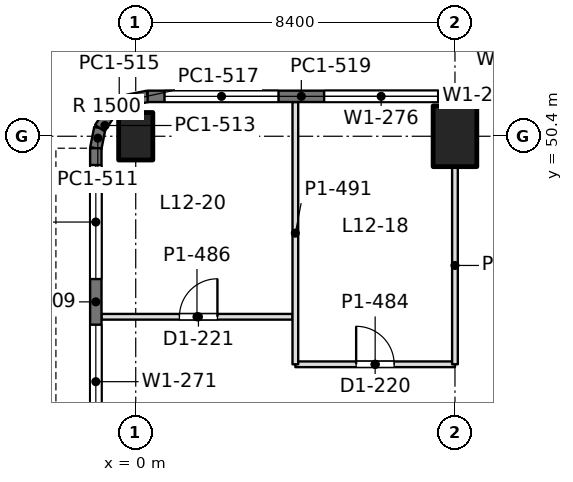
"""IFC4 building model, lengths in metres.
Left out: names, types, materials, properties, quantities, classifications, styles, units other than length and angle.
Written with IfcOpenShell. Run it as: python <this file> out.ifc"""

import sys

from ifc_helpers import new_model, si_unit, direction, frame, frame_2d, origin, origin_2d, place, context, subcontext, project, spatial, rectangle, extrude, element, fill, save


model = new_model("IFC4")
c1 = context("Model", 3, precision=1e-05, world=origin(), true_north=direction((0.0, 1.0)))
c2 = subcontext(c1, "Body", "Model", "MODEL_VIEW")
j1 = project(units=[si_unit("LENGTHUNIT", "METRE"), si_unit("PLANEANGLEUNIT", "RADIAN")], contexts=[c1])
p1 = place(None, origin())
s1 = spatial("IfcSite", under=j1, at=p1, CompositionType="ELEMENT")
p2 = place(p1, origin())
s2 = spatial("IfcBuilding", under=s1, at=p2, CompositionType="ELEMENT")
p3 = place(p2, frame((0.0, 0.0, 54.9)))
s3 = spatial("IfcBuildingStorey", under=s2, at=p3, CompositionType="ELEMENT", Elevation=54.9)
p4 = place(p3, frame((0.0, 50.4, 0.0), z_axis=(0.0, 0.0, 1.0), x_axis=(1.0, 0.0, 0.0)))
e1 = element("IfcColumn", 1, at=p4, inside=s3, PredefinedType="COLUMN", context=c2, shape_type="SweptSolid", body=[
    extrude(rectangle(XDim=0.9, YDim=1.25, at=origin_2d()), origin(), (0.0, 0.0, 1.0), 4.5),
])
p5 = place(p3, frame((8.4, 50.4, 0.0), z_axis=(0.0, 0.0, 1.0), x_axis=(1.0, 0.0, 0.0)))
e2 = element("IfcColumn", 2, at=p5, inside=s3, PredefinedType="COLUMN", context=c2, shape_type="SweptSolid", body=[
    extrude(rectangle(XDim=1.15, YDim=1.6, at=origin_2d()), origin(), (0.0, 0.0, 1.0), 4.5),
])
p6 = place(p3, frame((-1.05, 42.0, 0.0), z_axis=(0.0, 0.0, 1.0), x_axis=(0.0, 1.0, 0.0)))
e3 = element("IfcWall", 3, at=p6, inside=s3, PredefinedType="SOLIDWALL", context=c2, shape_type="SweptSolid", body=[
    extrude(rectangle(XDim=8.085, YDim=0.3, at=frame_2d((4.042, 0.0))), origin(), (0.0, 0.0, 1.0), 4.34),
])
p7 = place(p6, frame((0.443, 0.0, 0.9)))
e4 = element("IfcOpeningElement", 4, at=p7, cuts=e3, PredefinedType="OPENING", context=c2, shape_type="SweptSolid", body=[
    extrude(rectangle(XDim=3.0, YDim=1.9, at=frame_2d((1.5, 0.95))), frame((0.0, 0.16, 0.0), z_axis=(0.0, -1.0, 0.0), x_axis=(1.0, 0.0, 0.0)), (0.0, 0.0, 1.0), 0.32),
])
p8 = place(p6, frame((4.643, 0.0, 0.9)))
e5 = element("IfcOpeningElement", 5, at=p8, cuts=e3, PredefinedType="OPENING", context=c2, shape_type="SweptSolid", body=[
    extrude(rectangle(XDim=3.0, YDim=1.9, at=frame_2d((1.5, 0.95))), frame((0.0, 0.16, 0.0), z_axis=(0.0, -1.0, 0.0), x_axis=(1.0, 0.0, 0.0)), (0.0, 0.0, 1.0), 0.32),
])
p9 = place(p3, frame((-1.05, 50.085, 0.0), z_axis=(0.0, 0.0, 1.0), x_axis=(0.195073962632, 0.980788534345, 0.0)))
e6 = element("IfcWall", 6, at=p9, inside=s3, PredefinedType="SOLIDWALL", context=c2, shape_type="SweptSolid", body=[
    extrude(rectangle(XDim=0.541, YDim=0.3, at=frame_2d((0.271, 0.0))), origin(), (0.0, 0.0, 1.0), 4.34),
])
for number, where, z_axis, x_axis in (
    (7, (-0.945, 50.615, 0.0), (0.0, 0.0, 1.0), (0.556, 0.831, 0.0)),
    (8, (-0.653, 51.052, 0.0), (0.0, 0.0, 1.0), (0.831, 0.556, 0.0)),
):
    element("IfcWall", number, at=place(p3, frame(where, z_axis=z_axis, x_axis=x_axis)), inside=s3, PredefinedType="SOLIDWALL", context=c2, shape_type="SweptSolid", body=[
        extrude(rectangle(XDim=0.526, YDim=0.3, at=frame_2d((0.263, 0.0))), origin(), (0.0, 0.0, 1.0), 4.34),
    ])
p10 = place(p3, frame((-0.216, 51.344, 0.0), z_axis=(0.0, 0.0, 1.0), x_axis=(0.980788534345, 0.195073962632, 0.0)))
e9 = element("IfcWall", 9, at=p10, inside=s3, PredefinedType="SOLIDWALL", context=c2, shape_type="SweptSolid", body=[
    extrude(rectangle(XDim=0.541, YDim=0.3, at=frame_2d((0.271, 0.0))), origin(), (0.0, 0.0, 1.0), 4.34),
])
p11 = place(p3, frame((0.315, 51.45, 0.0), z_axis=(0.0, 0.0, 1.0), x_axis=(1.0, 0.0, 0.0)))
e10 = element("IfcWall", 10, at=p11, inside=s3, PredefinedType="SOLIDWALL", context=c2, shape_type="SweptSolid", body=[
    extrude(rectangle(XDim=8.085, YDim=0.3, at=frame_2d((4.042, 0.0))), origin(), (0.0, 0.0, 1.0), 4.34),
])
p12 = place(p11, frame((0.443, 0.0, 0.9)))
e11 = element("IfcOpeningElement", 11, at=p12, cuts=e10, PredefinedType="OPENING", context=c2, shape_type="SweptSolid", body=[
    extrude(rectangle(XDim=3.0, YDim=1.9, at=frame_2d((1.5, 0.95))), frame((0.0, 0.16, 0.0), z_axis=(0.0, -1.0, 0.0), x_axis=(1.0, 0.0, 0.0)), (0.0, 0.0, 1.0), 0.32),
])
p13 = place(p11, frame((4.643, 0.0, 0.9)))
e12 = element("IfcOpeningElement", 12, at=p13, cuts=e10, PredefinedType="OPENING", context=c2, shape_type="SweptSolid", body=[
    extrude(rectangle(XDim=3.0, YDim=1.9, at=frame_2d((1.5, 0.95))), frame((0.0, 0.16, 0.0), z_axis=(0.0, -1.0, 0.0), x_axis=(1.0, 0.0, 0.0)), (0.0, 0.0, 1.0), 0.32),
])
p14 = place(p3, frame((8.4, 51.45, 0.0), z_axis=(0.0, 0.0, 1.0), x_axis=(1.0, 0.0, 0.0)))
e13 = element("IfcWall", 13, at=p14, inside=s3, PredefinedType="SOLIDWALL", context=c2, shape_type="SweptSolid", body=[
    extrude(rectangle(XDim=8.4, YDim=0.3, at=frame_2d((4.2, 0.0))), origin(), (0.0, 0.0, 1.0), 4.34),
])
p15 = place(p14, frame((0.6, 0.0, 0.9)))
e14 = element("IfcOpeningElement", 14, at=p15, cuts=e13, PredefinedType="OPENING", context=c2, shape_type="SweptSolid", body=[
    extrude(rectangle(XDim=3.0, YDim=1.9, at=frame_2d((1.5, 0.95))), frame((0.0, 0.16, 0.0), z_axis=(0.0, -1.0, 0.0), x_axis=(1.0, 0.0, 0.0)), (0.0, 0.0, 1.0), 0.32),
])
p16 = place(p14, frame((4.8, 0.0, 0.9)))
e15 = element("IfcOpeningElement", 15, at=p16, cuts=e13, PredefinedType="OPENING", context=c2, shape_type="SweptSolid", body=[
    extrude(rectangle(XDim=3.0, YDim=1.9, at=frame_2d((1.5, 0.95))), frame((0.0, 0.16, 0.0), z_axis=(0.0, -1.0, 0.0), x_axis=(1.0, 0.0, 0.0)), (0.0, 0.0, 1.0), 0.32),
])
p17 = place(p3, frame((-0.902, 45.65, 0.0), z_axis=(0.0, 0.0, 1.0), x_axis=(1.0, 0.0, 0.0)))
e16 = element("IfcWall", 16, at=p17, inside=s3, PredefinedType="PARTITIONING", context=c2, shape_type="SweptSolid", body=[
    extrude(rectangle(XDim=5.028, YDim=0.15, at=frame_2d((2.514, 0.0))), origin(), (0.0, 0.0, 1.0), 3.84),
])
p18 = place(p17, frame((2.052, 0.0, 0.0)))
e17 = element("IfcOpeningElement", 17, at=p18, cuts=e16, PredefinedType="OPENING", context=c2, shape_type="SweptSolid", body=[
    extrude(rectangle(XDim=1.0, YDim=2.2, at=frame_2d((0.5, 1.1))), frame((0.0, 0.085, 0.0), z_axis=(0.0, -1.0, 0.0), x_axis=(1.0, 0.0, 0.0)), (0.0, 0.0, 1.0), 0.17),
])
p19 = place(p3, frame((4.2, 44.4, 0.0), z_axis=(0.0, 0.0, 1.0), x_axis=(1.0, 0.0, 0.0)))
e18 = element("IfcWall", 18, at=p19, inside=s3, PredefinedType="PARTITIONING", context=c2, shape_type="SweptSolid", body=[
    extrude(rectangle(XDim=4.2, YDim=0.15, at=frame_2d((2.1, 0.0))), origin(), (0.0, 0.0, 1.0), 3.74),
])
p20 = place(p19, frame((1.6, 0.0, 0.0)))
e19 = element("IfcOpeningElement", 19, at=p20, cuts=e18, PredefinedType="OPENING", context=c2, shape_type="SweptSolid", body=[
    extrude(rectangle(XDim=1.0, YDim=2.2, at=frame_2d((0.5, 1.1))), frame((0.0, 0.085, 0.0), z_axis=(0.0, -1.0, 0.0), x_axis=(1.0, 0.0, 0.0)), (0.0, 0.0, 1.0), 0.17),
])
p21 = place(p3, frame((4.2, 44.4, 0.0), z_axis=(0.0, 0.0, 1.0), x_axis=(0.0, 1.0, 0.0)))
e20 = element("IfcWall", 20, at=p21, inside=s3, PredefinedType="PARTITIONING", context=c2, shape_type="SweptSolid", body=[
    extrude(rectangle(XDim=6.902, YDim=0.15, at=frame_2d((3.451, 0.0))), origin(), (0.0, 0.0, 1.0), 3.84),
])
p22 = place(p3, frame((8.4, 44.4, 0.0), z_axis=(0.0, 0.0, 1.0), x_axis=(0.0, 1.0, 0.0)))
e21 = element("IfcWall", 21, at=p22, inside=s3, PredefinedType="PARTITIONING", context=c2, shape_type="SweptSolid", body=[
    extrude(rectangle(XDim=5.201, YDim=0.15, at=frame_2d((2.601, 0.0))), origin(), (0.0, 0.0, 1.0), 3.74),
])
p23 = place(p7, origin())
e22 = element("IfcWindow", 22, at=p23, inside=s3, PartitioningType="SINGLE_PANEL", PredefinedType="WINDOW", context=c2, shape_type="SweptSolid", body=[
    extrude(rectangle(XDim=3.0, YDim=1.9, at=frame_2d((1.5, 0.95))), frame((0.0, 0.03, 0.0), z_axis=(0.0, -1.0, 0.0), x_axis=(1.0, 0.0, 0.0)), (0.0, 0.0, 1.0), 0.06),
])
fill(e4, e22)
p24 = place(p8, origin())
e23 = element("IfcWindow", 23, at=p24, inside=s3, PartitioningType="SINGLE_PANEL", PredefinedType="WINDOW", context=c2, shape_type="SweptSolid", body=[
    extrude(rectangle(XDim=3.0, YDim=1.9, at=frame_2d((1.5, 0.95))), frame((0.0, 0.03, 0.0), z_axis=(0.0, -1.0, 0.0), x_axis=(1.0, 0.0, 0.0)), (0.0, 0.0, 1.0), 0.06),
])
fill(e5, e23)
p25 = place(p12, origin())
e24 = element("IfcWindow", 24, at=p25, inside=s3, PartitioningType="SINGLE_PANEL", PredefinedType="WINDOW", context=c2, shape_type="SweptSolid", body=[
    extrude(rectangle(XDim=3.0, YDim=1.9, at=frame_2d((1.5, 0.95))), frame((0.0, 0.03, 0.0), z_axis=(0.0, -1.0, 0.0), x_axis=(1.0, 0.0, 0.0)), (0.0, 0.0, 1.0), 0.06),
])
fill(e11, e24)
p26 = place(p13, origin())
e25 = element("IfcWindow", 25, at=p26, inside=s3, PartitioningType="SINGLE_PANEL", PredefinedType="WINDOW", context=c2, shape_type="SweptSolid", body=[
    extrude(rectangle(XDim=3.0, YDim=1.9, at=frame_2d((1.5, 0.95))), frame((0.0, 0.03, 0.0), z_axis=(0.0, -1.0, 0.0), x_axis=(1.0, 0.0, 0.0)), (0.0, 0.0, 1.0), 0.06),
])
fill(e12, e25)
p27 = place(p15, origin())
e26 = element("IfcWindow", 26, at=p27, inside=s3, PartitioningType="SINGLE_PANEL", PredefinedType="WINDOW", context=c2, shape_type="SweptSolid", body=[
    extrude(rectangle(XDim=3.0, YDim=1.9, at=frame_2d((1.5, 0.95))), frame((0.0, 0.03, 0.0), z_axis=(0.0, -1.0, 0.0), x_axis=(1.0, 0.0, 0.0)), (0.0, 0.0, 1.0), 0.06),
])
fill(e14, e26)
p28 = place(p18, origin())
e27 = element("IfcDoor", 27, at=p28, inside=s3, OperationType="SINGLE_SWING_RIGHT", PredefinedType="DOOR", context=c2, shape_type="SweptSolid", body=[
    extrude(rectangle(XDim=1.0, YDim=2.2, at=frame_2d((0.5, 1.1))), frame((0.0, 0.025, 0.0), z_axis=(0.0, -1.0, 0.0), x_axis=(1.0, 0.0, 0.0)), (0.0, 0.0, 1.0), 0.05),
])
fill(e17, e27)
p29 = place(p20, origin())
e28 = element("IfcDoor", 28, at=p29, inside=s3, OperationType="SINGLE_SWING_LEFT", PredefinedType="DOOR", context=c2, shape_type="SweptSolid", body=[
    extrude(rectangle(XDim=1.0, YDim=2.2, at=frame_2d((0.5, 1.1))), frame((0.0, 0.025, 0.0), z_axis=(0.0, -1.0, 0.0), x_axis=(1.0, 0.0, 0.0)), (0.0, 0.0, 1.0), 0.05),
])
fill(e19, e28)
save(model, sys.argv[1])
